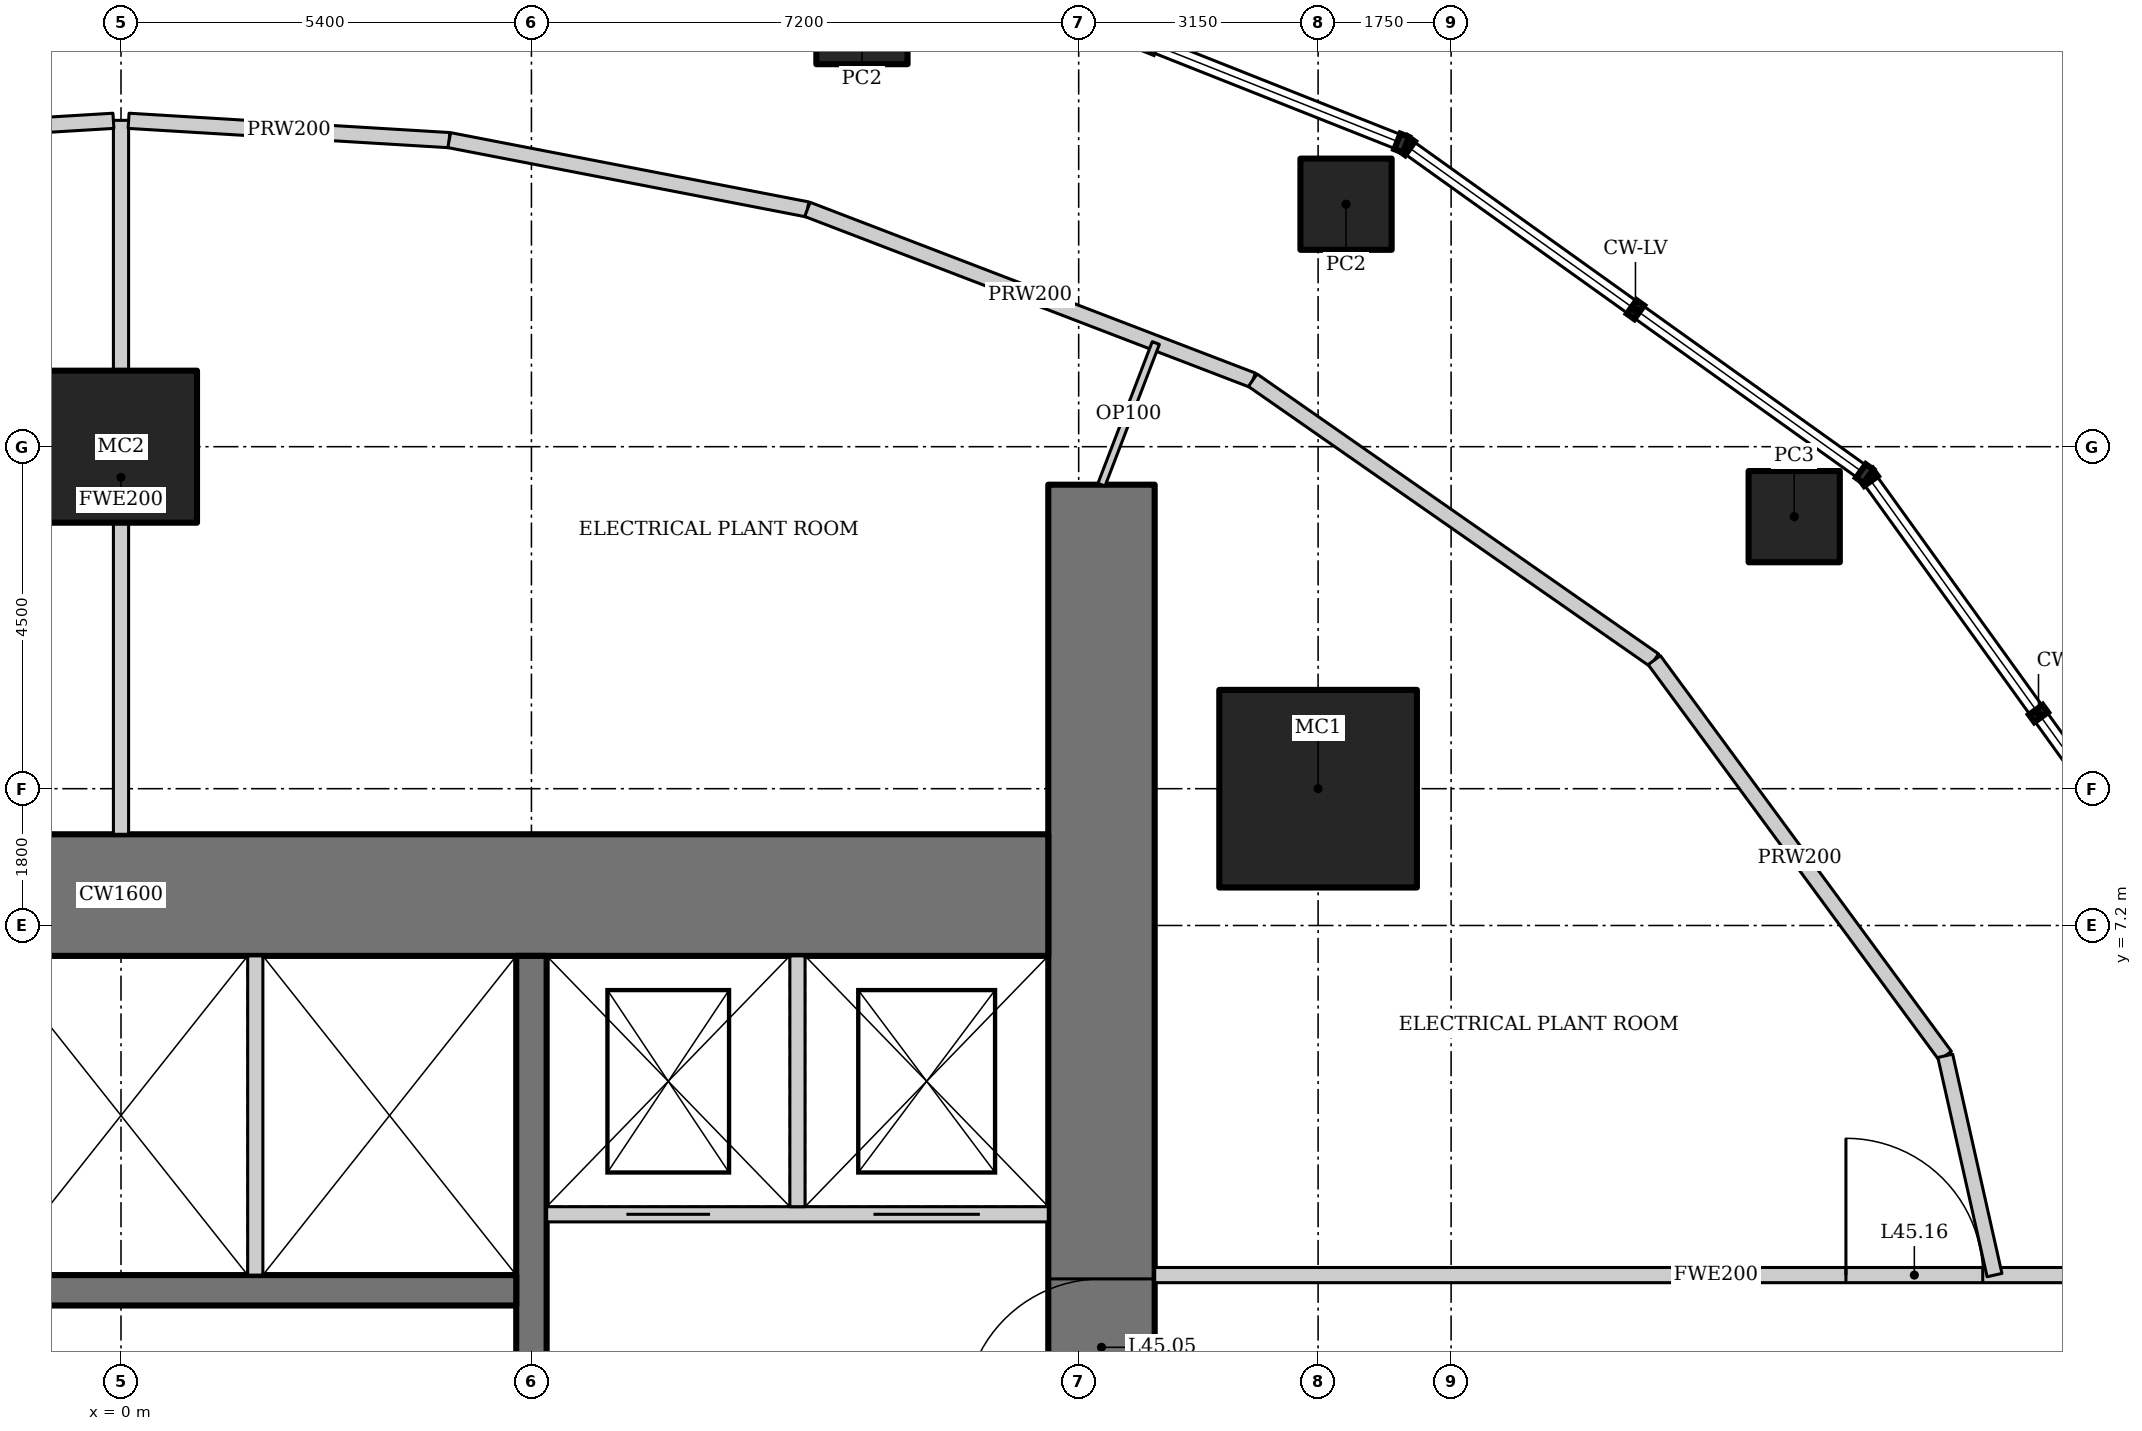
"""IFC4 building model, lengths in metres.
Left out: names, types, materials, properties, quantities, classifications, styles, units other than length and angle.
Written with IfcOpenShell. Run it as: python <this file> out.ifc"""

import sys

from ifc_helpers import new_model, si_unit, direction, frame, frame_2d, origin, origin_2d, place, context, subcontext, project, spatial, rectangle, hollow_rectangle, extrude, element, fill, save


model = new_model("IFC4")
c1 = context("Model", 3, precision=1e-05, world=origin(), true_north=direction((0.0, 1.0)))
c2 = subcontext(c1, "Body", "Model", "MODEL_VIEW")
j1 = project(units=[si_unit("LENGTHUNIT", "METRE"), si_unit("PLANEANGLEUNIT", "RADIAN")], contexts=[c1])
p1 = place(None, origin())
s1 = spatial("IfcSite", under=j1, at=p1, CompositionType="ELEMENT")
p2 = place(p1, origin())
s2 = spatial("IfcBuilding", under=s1, at=p2, CompositionType="ELEMENT")
p3 = place(p2, frame((0.0, 0.0, 193.0)))
s3 = spatial("IfcBuildingStorey", under=s2, at=p3, CompositionType="ELEMENT", Elevation=193.0)
p4 = place(p3, frame((15.75, 9.0, 0.0), z_axis=(0.0, 0.0, 1.0), x_axis=(1.0, 0.0, 0.0)))
e1 = element("IfcColumn", 1, at=p4, inside=s3, PredefinedType="COLUMN", context=c2, shape_type="SweptSolid", body=[
    extrude(hollow_rectangle(XDim=2.6, YDim=2.6, WallThickness=0.13, at=origin_2d()), origin(), (0.0, 0.0, 1.0), 6.0),
])
p5 = place(p3, frame((0.0, 13.5, 0.0), z_axis=(0.0, 0.0, 1.0), x_axis=(1.0, 0.0, 0.0)))
e2 = element("IfcColumn", 2, at=p5, inside=s3, PredefinedType="COLUMN", context=c2, shape_type="SweptSolid", body=[
    extrude(hollow_rectangle(XDim=2.0, YDim=2.0, WallThickness=0.17, at=origin_2d()), origin(), (0.0, 0.0, 1.0), 6.0),
])
p6 = place(p3, frame((26.42, 6.587, 0.0), z_axis=(-0.300740657131, -0.074975456692, 0.950754299513), x_axis=(0.24189877761, -0.970301489946, 0.0)))
e3 = element("IfcColumn", 3, at=p6, inside=s3, PredefinedType="COLUMN", context=c2, shape_type="SweptSolid", body=[
    extrude(hollow_rectangle(XDim=1.2, YDim=1.2, WallThickness=0.1, at=origin_2d()), origin(), (0.0, 0.0, 1.0), 6.112),
])
p7 = place(p3, frame((22.014, 12.579, 0.0), z_axis=(-0.253597337108, -0.144907034473, 0.956394448945), x_axis=(0.496124150365, -0.868251592238, 0.0)))
e4 = element("IfcColumn", 4, at=p7, inside=s3, PredefinedType="COLUMN", context=c2, shape_type="SweptSolid", body=[
    extrude(hollow_rectangle(XDim=1.2, YDim=1.2, WallThickness=0.12, at=origin_2d()), origin(), (0.0, 0.0, 1.0), 6.087),
])
p8 = place(p3, frame((16.118, 16.69, 0.0), z_axis=(-0.18822591258, -0.194872023339, 0.962598514623), x_axis=(0.719265676815, -0.69473511942, 0.0)))
e5 = element("IfcColumn", 5, at=p8, inside=s3, PredefinedType="COLUMN", context=c2, shape_type="SweptSolid", body=[
    extrude(hollow_rectangle(XDim=1.2, YDim=1.2, WallThickness=0.1, at=origin_2d()), origin(), (0.0, 0.0, 1.0), 6.061),
])
p9 = place(p3, frame((9.749, 19.133, 0.0), z_axis=(-0.115072645182, -0.225902794668, 0.967329423564), x_axis=(0.891055307505, -0.45389474437, 0.0)))
e6 = element("IfcColumn", 6, at=p9, inside=s3, PredefinedType="COLUMN", context=c2, shape_type="SweptSolid", body=[
    extrude(hollow_rectangle(XDim=1.2, YDim=1.2, WallThickness=0.1, at=origin_2d()), origin(), (0.0, 0.0, 1.0), 6.042),
])
p10 = place(p3, frame((4.645, 20.12, 0.0), z_axis=(-0.055108290298, -0.23884305259, 0.969493203983), x_axis=(0.974399541185, -0.224823339843, 0.0)))
e7 = element("IfcColumn", 7, at=p10, inside=s3, PredefinedType="COLUMN", context=c2, shape_type="SweptSolid", body=[
    extrude(hollow_rectangle(XDim=1.2, YDim=1.2, WallThickness=0.1, at=origin_2d()), origin(), (0.0, 0.0, 1.0), 6.034),
])
p11 = place(p3, frame((0.0, 20.4, 0.0), z_axis=(0.0, -0.242535625036, 0.970142500145), x_axis=(1.0, 0.0, 0.0)))
e8 = element("IfcColumn", 8, at=p11, inside=s3, PredefinedType="COLUMN", context=c2, shape_type="SweptSolid", body=[
    extrude(hollow_rectangle(XDim=1.4, YDim=1.4, WallThickness=0.1, at=origin_2d()), origin(), (0.0, 0.0, 1.0), 6.007),
])
p12 = place(p3, frame((12.9, -13.0, 0.0), z_axis=(0.0, 0.0, 1.0), x_axis=(0.0, 1.0, 0.0)))
e9 = element("IfcWall", 9, at=p12, inside=s3, PredefinedType="SHEAR", context=c2, shape_type="SweptSolid", body=[
    extrude(rectangle(XDim=26.0, YDim=1.4, at=frame_2d((13.0, 0.0))), origin(), (0.0, 0.0, 1.0), 6.0),
])
p13 = place(p12, frame((13.75, 0.0, 0.0)))
e10 = element("IfcOpeningElement", 10, at=p13, cuts=e9, PredefinedType="OPENING", context=c2, shape_type="SweptSolid", body=[
    extrude(rectangle(XDim=1.8, YDim=2.1, at=frame_2d((0.9, 1.05))), frame((0.0, 0.71, 0.0), z_axis=(0.0, -1.0, 0.0), x_axis=(1.0, 0.0, 0.0)), (0.0, 0.0, 1.0), 1.42),
])
p14 = place(p3, frame((12.2, 7.6, 0.0), z_axis=(0.0, 0.0, 1.0), x_axis=(-1.0, 0.0, 0.0)))
e11 = element("IfcWall", 11, at=p14, inside=s3, PredefinedType="SHEAR", context=c2, shape_type="SweptSolid", body=[
    extrude(rectangle(XDim=24.4, YDim=1.6, at=frame_2d((12.2, 0.0))), origin(), (0.0, 0.0, 1.0), 6.0),
])
p15 = place(p3, frame((5.4, -6.8, 0.0), z_axis=(0.0, 0.0, 1.0), x_axis=(0.0, 1.0, 0.0)))
e12 = element("IfcWall", 12, at=p15, inside=s3, PredefinedType="SHEAR", context=c2, shape_type="SweptSolid", body=[
    extrude(rectangle(XDim=13.6, YDim=0.4, at=frame_2d((6.8, 0.0))), origin(), (0.0, 0.0, 1.0), 6.0),
])
p16 = place(p15, frame((5.9, 0.0, 0.0)))
e13 = element("IfcOpeningElement", 13, at=p16, cuts=e12, PredefinedType="OPENING", context=c2, shape_type="SweptSolid", body=[
    extrude(rectangle(XDim=1.8, YDim=2.1, at=frame_2d((0.9, 1.05))), frame((0.0, 0.21, 0.0), z_axis=(0.0, -1.0, 0.0), x_axis=(1.0, 0.0, 0.0)), (0.0, 0.0, 1.0), 0.42),
])
p17 = place(p3, frame((5.2, 2.4, 0.0), z_axis=(0.0, 0.0, 1.0), x_axis=(-1.0, 0.0, 0.0)))
e14 = element("IfcWall", 14, at=p17, inside=s3, PredefinedType="SHEAR", context=c2, shape_type="SweptSolid", body=[
    extrude(rectangle(XDim=10.4, YDim=0.4, at=frame_2d((5.2, 0.0))), origin(), (0.0, 0.0, 1.0), 6.0),
])
p18 = place(p3, frame((1.767, 2.6, 0.0), z_axis=(0.0, 0.0, 1.0), x_axis=(0.0, 1.0, 0.0)))
e15 = element("IfcWall", 15, at=p18, inside=s3, PredefinedType="SOLIDWALL", context=c2, shape_type="SweptSolid", body=[
    extrude(rectangle(XDim=4.2, YDim=0.2, at=frame_2d((2.1, 0.0))), origin(), (0.0, 0.0, 1.0), 6.0),
])
p19 = place(p3, frame((12.2, 3.4, 0.0), z_axis=(0.0, 0.0, 1.0), x_axis=(-1.0, 0.0, 0.0)))
e16 = element("IfcWall", 16, at=p19, inside=s3, PredefinedType="SOLIDWALL", context=c2, shape_type="SweptSolid", body=[
    extrude(rectangle(XDim=6.6, YDim=0.2, at=frame_2d((3.3, 0.0))), origin(), (0.0, 0.0, 1.0), 6.0),
])
p20 = place(p19, frame((4.45, 0.0, 0.0)))
e17 = element("IfcOpeningElement", 17, at=p20, cuts=e16, PredefinedType="OPENING", context=c2, shape_type="SweptSolid", body=[
    extrude(rectangle(XDim=1.1, YDim=2.2, at=frame_2d((0.55, 1.1))), frame((0.0, 0.11, 0.0), z_axis=(0.0, -1.0, 0.0), x_axis=(1.0, 0.0, 0.0)), (0.0, 0.0, 1.0), 0.22),
])
p21 = place(p19, frame((0.9, 0.0, 0.0)))
e18 = element("IfcOpeningElement", 18, at=p21, cuts=e16, PredefinedType="OPENING", context=c2, shape_type="SweptSolid", body=[
    extrude(rectangle(XDim=1.4, YDim=2.2, at=frame_2d((0.7, 1.1))), frame((0.0, 0.11, 0.0), z_axis=(0.0, -1.0, 0.0), x_axis=(1.0, 0.0, 0.0)), (0.0, 0.0, 1.0), 0.22),
])
p22 = place(p3, frame((8.9, 3.5, 0.0), z_axis=(0.0, 0.0, 1.0), x_axis=(0.0, 1.0, 0.0)))
e19 = element("IfcWall", 19, at=p22, inside=s3, PredefinedType="SOLIDWALL", context=c2, shape_type="SweptSolid", body=[
    extrude(rectangle(XDim=3.3, YDim=0.2, at=frame_2d((1.65, 0.0))), origin(), (0.0, 0.0, 1.0), 6.0),
])
p23 = place(p3, frame((13.6, 2.6, 0.0), z_axis=(0.0, 0.0, 1.0), x_axis=(1.0, 0.0, 0.0)))
e20 = element("IfcWall", 20, at=p23, inside=s3, PredefinedType="SOLIDWALL", context=c2, shape_type="SweptSolid", body=[
    extrude(rectangle(XDim=14.77, YDim=0.2, at=frame_2d((7.385, 0.0))), origin(), (0.0, 0.0, 1.0), 5.85),
])
p24 = place(p23, frame((9.095, 0.0, 0.0)))
e21 = element("IfcOpeningElement", 21, at=p24, cuts=e20, PredefinedType="OPENING", context=c2, shape_type="SweptSolid", body=[
    extrude(rectangle(XDim=1.8, YDim=2.1, at=frame_2d((0.9, 1.05))), frame((0.0, 0.11, 0.0), z_axis=(0.0, -1.0, 0.0), x_axis=(1.0, 0.0, 0.0)), (0.0, 0.0, 1.0), 0.22),
])
p25 = place(p3, frame((0.0, 8.4, 0.0), z_axis=(0.0, 0.0, 1.0), x_axis=(0.0, 1.0, 0.0)))
e22 = element("IfcWall", 22, at=p25, inside=s3, PredefinedType="SOLIDWALL", context=c2, shape_type="SweptSolid", body=[
    extrude(rectangle(XDim=9.394, YDim=0.2, at=frame_2d((4.697, 0.0))), origin(), (0.0, 0.0, 1.0), 4.65),
])
for number, where, z_axis, x_axis in (
    (23, (-4.318, 17.534, 0.0), (0.0, 0.0, 1.0), (0.998, 0.06, 0.0)),
    (24, (0.1, 17.788, 0.0), (0.0, 0.0, 1.0), (0.998, -0.06, 0.0)),
):
    element("IfcWall", number, at=place(p3, frame(where, z_axis=z_axis, x_axis=x_axis)), inside=s3, PredefinedType="SOLIDWALL", context=c2, shape_type="SweptSolid", body=[
        extrude(rectangle(XDim=4.226, YDim=0.2, at=frame_2d((2.113, 0.0))), origin(), (0.0, 0.0, 1.0), 5.85),
    ])
p26 = place(p3, frame((4.318, 17.534, 0.0), z_axis=(0.0, 0.0, 1.0), x_axis=(0.981807084442, -0.189881144245, 0.0)))
e25 = element("IfcWall", 25, at=p26, inside=s3, PredefinedType="SOLIDWALL", context=c2, shape_type="SweptSolid", body=[
    extrude(rectangle(XDim=4.8, YDim=0.2, at=frame_2d((2.4, 0.0))), origin(), (0.0, 0.0, 1.0), 5.85),
])
p27 = place(p3, frame((9.031, 16.622, 0.0), z_axis=(0.0, 0.0, 1.0), x_axis=(0.933673071728, -0.358126507159, 0.0)))
e26 = element("IfcWall", 26, at=p27, inside=s3, PredefinedType="SOLIDWALL", context=c2, shape_type="SweptSolid", body=[
    extrude(rectangle(XDim=6.276, YDim=0.2, at=frame_2d((3.138, 0.0))), origin(), (0.0, 0.0, 1.0), 5.85),
])
p28 = place(p3, frame((14.89, 14.375, 0.0), z_axis=(0.0, 0.0, 1.0), x_axis=(0.820274205327, -0.571970478324, 0.0)))
e27 = element("IfcWall", 27, at=p28, inside=s3, PredefinedType="SOLIDWALL", context=c2, shape_type="SweptSolid", body=[
    extrude(rectangle(XDim=6.44, YDim=0.2, at=frame_2d((3.22, 0.0))), origin(), (0.0, 0.0, 1.0), 5.85),
])
p29 = place(p3, frame((20.173, 10.691, 0.0), z_axis=(0.0, 0.0, 1.0), x_axis=(0.592429396569, -0.805622374367, 0.0)))
e28 = element("IfcWall", 28, at=p29, inside=s3, PredefinedType="SOLIDWALL", context=c2, shape_type="SweptSolid", body=[
    extrude(rectangle(XDim=6.462, YDim=0.2, at=frame_2d((3.231, 0.0))), origin(), (0.0, 0.0, 1.0), 5.85),
])
p30 = place(p3, frame((24.001, 5.485, 0.0), z_axis=(0.0, 0.0, 1.0), x_axis=(0.219211589051, -0.975677343811, 0.0)))
e29 = element("IfcWall", 29, at=p30, inside=s3, PredefinedType="SOLIDWALL", context=c2, shape_type="SweptSolid", body=[
    extrude(rectangle(XDim=2.957, YDim=0.2, at=frame_2d((1.479, 0.0))), origin(), (0.0, 0.0, 1.0), 5.85),
])
p31 = place(p3, frame((12.9, 13.0, 0.0), z_axis=(0.0, 0.0, 1.0), x_axis=(0.358175892566, 0.9336541276, 0.0)))
e30 = element("IfcWall", 30, at=p31, inside=s3, PredefinedType="PARTITIONING", context=c2, shape_type="SweptSolid", body=[
    extrude(rectangle(XDim=1.997, YDim=0.1, at=frame_2d((0.998, 0.0))), origin(), (0.0, 0.0, 1.0), 5.85),
])
p32 = place(p13, origin())
e31 = element("IfcDoor", 31, at=p32, inside=s3, OperationType="DOUBLE_DOOR_DOUBLE_SWING", PredefinedType="DOOR", context=c2, shape_type="SweptSolid", body=[
    extrude(rectangle(XDim=1.8, YDim=2.1, at=frame_2d((0.9, 1.05))), frame((0.0, 0.025, 0.0), z_axis=(0.0, -1.0, 0.0), x_axis=(1.0, 0.0, 0.0)), (0.0, 0.0, 1.0), 0.05),
])
fill(e10, e31)
p33 = place(p20, origin())
e32 = element("IfcDoor", 32, at=p33, inside=s3, OperationType="DOUBLE_DOOR_SLIDING", PredefinedType="DOOR", context=c2, shape_type="SweptSolid", body=[
    extrude(rectangle(XDim=1.1, YDim=2.2, at=frame_2d((0.55, 1.1))), frame((0.0, 0.025, 0.0), z_axis=(0.0, -1.0, 0.0), x_axis=(1.0, 0.0, 0.0)), (0.0, 0.0, 1.0), 0.05),
])
fill(e17, e32)
p34 = place(p21, origin())
e33 = element("IfcDoor", 33, at=p34, inside=s3, OperationType="DOUBLE_DOOR_SLIDING", PredefinedType="DOOR", context=c2, shape_type="SweptSolid", body=[
    extrude(rectangle(XDim=1.4, YDim=2.2, at=frame_2d((0.7, 1.1))), frame((0.0, 0.025, 0.0), z_axis=(0.0, -1.0, 0.0), x_axis=(1.0, 0.0, 0.0)), (0.0, 0.0, 1.0), 0.05),
])
fill(e18, e33)
p35 = place(p24, origin())
e34 = element("IfcDoor", 34, at=p35, inside=s3, OperationType="DOUBLE_DOOR_DOUBLE_SWING", PredefinedType="DOOR", context=c2, shape_type="SweptSolid", body=[
    extrude(rectangle(XDim=1.8, YDim=2.1, at=frame_2d((0.9, 1.05))), frame((0.0, 0.025, 0.0), z_axis=(0.0, -1.0, 0.0), x_axis=(1.0, 0.0, 0.0)), (0.0, 0.0, 1.0), 0.05),
])
fill(e21, e34)
save(model, sys.argv[1])
